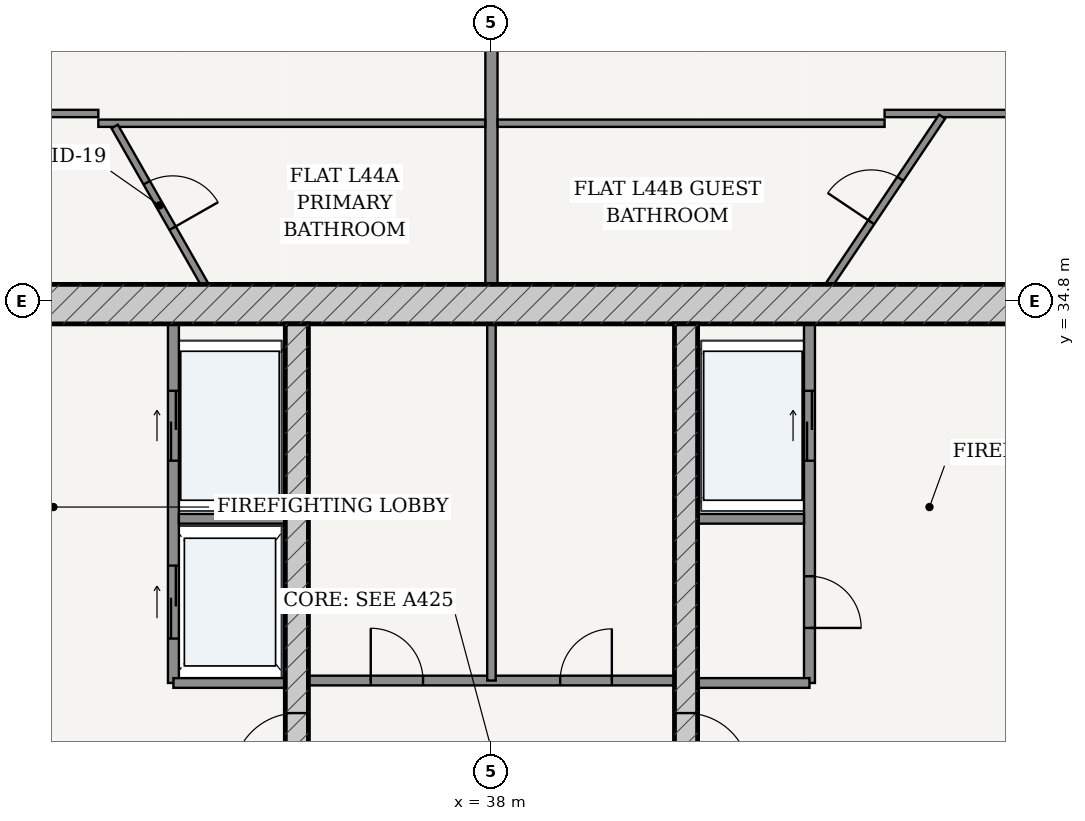
"""IFC4 building model, lengths in metres.
Left out: names, types, materials, properties, quantities, classifications, styles, units other than length and angle.
Written with IfcOpenShell. Run it as: python <this file> out.ifc"""

import sys

from ifc_helpers import new_model, si_unit, direction, frame, frame_2d, origin, place, context, subcontext, project, spatial, rectangle, extrude, source, transform, mapped, element, fill, save


model = new_model("IFC4")
c1 = context("Model", 3, precision=1e-05, world=origin(), true_north=direction((-0.2419218956, 0.970295726276)))
c2 = subcontext(c1, "Body", "Model", "MODEL_VIEW")
j1 = project(units=[si_unit("LENGTHUNIT", "METRE"), si_unit("PLANEANGLEUNIT", "RADIAN")], contexts=[c1])
p1 = place(None, origin())
s1 = spatial("IfcSite", under=j1, at=p1, CompositionType="ELEMENT")
p2 = place(p1, origin())
s2 = spatial("IfcBuilding", under=s1, at=p2, CompositionType="ELEMENT")
p3 = place(p2, frame((0.0, 0.0, 167.8)))
s3 = spatial("IfcBuildingStorey", under=s2, at=p3, CompositionType="ELEMENT", Elevation=167.8)
p4 = place(p3, frame((28.725, 34.75, 0.0), z_axis=(0.0, 0.0, 1.0), x_axis=(1.0, 0.0, 0.0)))
e1 = element("IfcWall", 1, at=p4, inside=s3, PredefinedType="SHEAR", context=c2, shape_type="SweptSolid", body=[
    extrude(rectangle(XDim=18.55, YDim=0.65, at=frame_2d((9.275, 0.0))), origin(), (0.0, 0.0, 1.0), 3.33),
])
p5 = place(p3, frame((34.8, 19.175, 0.0), z_axis=(0.0, 0.0, 1.0), x_axis=(0.0, 1.0, 0.0)))
e2 = element("IfcWall", 2, at=p5, inside=s3, PredefinedType="SHEAR", context=c2, shape_type="SweptSolid", body=[
    extrude(rectangle(XDim=15.25, YDim=0.38, at=frame_2d((7.625, 0.0))), origin(), (0.0, 0.0, 1.0), 3.33),
])
p6 = place(p5, frame((7.8, 0.0, 0.0)))
e3 = element("IfcOpeningElement", 3, at=p6, cuts=e2, PredefinedType="OPENING", context=c2, shape_type="SweptSolid", body=[
    extrude(rectangle(XDim=1.05, YDim=2.15, at=frame_2d((0.525, 1.075))), frame((0.0, 0.2, 0.0), z_axis=(0.0, -1.0, 0.0), x_axis=(1.0, 0.0, 0.0)), (0.0, 0.0, 1.0), 0.4),
])
p7 = place(p3, frame((41.2, 19.175, 0.0), z_axis=(0.0, 0.0, 1.0), x_axis=(0.0, 1.0, 0.0)))
e4 = element("IfcWall", 4, at=p7, inside=s3, PredefinedType="SHEAR", context=c2, shape_type="SweptSolid", body=[
    extrude(rectangle(XDim=15.25, YDim=0.38, at=frame_2d((7.625, 0.0))), origin(), (0.0, 0.0, 1.0), 3.33),
])
p8 = place(p7, frame((7.8, 0.0, 0.0)))
e5 = element("IfcOpeningElement", 5, at=p8, cuts=e4, PredefinedType="OPENING", context=c2, shape_type="SweptSolid", body=[
    extrude(rectangle(XDim=1.05, YDim=2.15, at=frame_2d((0.525, 1.075))), frame((0.0, 0.2, 0.0), z_axis=(0.0, -1.0, 0.0), x_axis=(1.0, 0.0, 0.0)), (0.0, 0.0, 1.0), 0.4),
])
p9 = place(p3, frame((32.77, 28.52, 0.0), z_axis=(0.0, 0.0, 1.0), x_axis=(0.0, 1.0, 0.0)))
e6 = element("IfcWall", 6, at=p9, inside=s3, PredefinedType="PARTITIONING", context=c2, shape_type="SweptSolid", body=[
    extrude(rectangle(XDim=5.905, YDim=0.18, at=frame_2d((2.953, 0.0))), origin(), (0.0, 0.0, 1.0), 3.33),
])
p10 = place(p9, frame((3.655, 0.0, 0.0)))
e7 = element("IfcOpeningElement", 7, at=p10, cuts=e6, PredefinedType="OPENING", context=c2, shape_type="SweptSolid", body=[
    extrude(rectangle(XDim=1.15, YDim=2.2, at=frame_2d((0.575, 1.1))), frame((0.0, 0.1, 0.0), z_axis=(0.0, -1.0, 0.0), x_axis=(1.0, 0.0, 0.0)), (0.0, 0.0, 1.0), 0.2),
])
p11 = place(p9, frame((0.73, 0.0, 0.0)))
e8 = element("IfcOpeningElement", 8, at=p11, cuts=e6, PredefinedType="OPENING", context=c2, shape_type="SweptSolid", body=[
    extrude(rectangle(XDim=1.2, YDim=2.25, at=frame_2d((0.6, 1.125))), frame((0.0, 0.1, 0.0), z_axis=(0.0, -1.0, 0.0), x_axis=(1.0, 0.0, 0.0)), (0.0, 0.0, 1.0), 0.2),
])
p12 = place(p3, frame((32.86, 31.22, 0.0), z_axis=(0.0, 0.0, 1.0), x_axis=(1.0, 0.0, 0.0)))
e9 = element("IfcWall", 9, at=p12, inside=s3, PredefinedType="PARTITIONING", context=c2, shape_type="SweptSolid", body=[
    extrude(rectangle(XDim=1.75, YDim=0.16, at=frame_2d((0.875, 0.0))), origin(), (0.0, 0.0, 1.0), 3.33),
])
p13 = place(p3, frame((32.77, 28.52, 0.0), z_axis=(0.0, 0.0, 1.0), x_axis=(1.0, 0.0, 0.0)))
e10 = element("IfcWall", 10, at=p13, inside=s3, PredefinedType="PARTITIONING", context=c2, shape_type="SweptSolid", body=[
    extrude(rectangle(XDim=1.84, YDim=0.16, at=frame_2d((0.92, 0.0))), origin(), (0.0, 0.0, 1.0), 3.33),
])
p14 = place(p3, frame((43.23, 28.52, 0.0), z_axis=(0.0, 0.0, 1.0), x_axis=(0.0, 1.0, 0.0)))
e11 = element("IfcWall", 11, at=p14, inside=s3, PredefinedType="PARTITIONING", context=c2, shape_type="SweptSolid", body=[
    extrude(rectangle(XDim=5.905, YDim=0.18, at=frame_2d((2.953, 0.0))), origin(), (0.0, 0.0, 1.0), 3.33),
])
p15 = place(p14, frame((0.905, 0.0, 0.0)))
e12 = element("IfcOpeningElement", 12, at=p15, cuts=e11, PredefinedType="OPENING", context=c2, shape_type="SweptSolid", body=[
    extrude(rectangle(XDim=0.85, YDim=2.1, at=frame_2d((0.425, 1.05))), frame((0.0, 0.1, 0.0), z_axis=(0.0, -1.0, 0.0), x_axis=(1.0, 0.0, 0.0)), (0.0, 0.0, 1.0), 0.2),
])
p16 = place(p14, frame((3.655, 0.0, 0.0)))
e13 = element("IfcOpeningElement", 13, at=p16, cuts=e11, PredefinedType="OPENING", context=c2, shape_type="SweptSolid", body=[
    extrude(rectangle(XDim=1.15, YDim=2.2, at=frame_2d((0.575, 1.1))), frame((0.0, 0.1, 0.0), z_axis=(0.0, -1.0, 0.0), x_axis=(1.0, 0.0, 0.0)), (0.0, 0.0, 1.0), 0.2),
])
p17 = place(p3, frame((41.39, 31.22, 0.0), z_axis=(0.0, 0.0, 1.0), x_axis=(1.0, 0.0, 0.0)))
e14 = element("IfcWall", 14, at=p17, inside=s3, PredefinedType="PARTITIONING", context=c2, shape_type="SweptSolid", body=[
    extrude(rectangle(XDim=1.75, YDim=0.16, at=frame_2d((0.875, 0.0))), origin(), (0.0, 0.0, 1.0), 3.33),
])
p18 = place(p3, frame((41.39, 28.52, 0.0), z_axis=(0.0, 0.0, 1.0), x_axis=(1.0, 0.0, 0.0)))
e15 = element("IfcWall", 15, at=p18, inside=s3, PredefinedType="PARTITIONING", context=c2, shape_type="SweptSolid", body=[
    extrude(rectangle(XDim=1.84, YDim=0.16, at=frame_2d((0.92, 0.0))), origin(), (0.0, 0.0, 1.0), 3.33),
])
p19 = place(p3, frame((34.99, 28.56, 0.0), z_axis=(0.0, 0.0, 1.0), x_axis=(1.0, 0.0, 0.0)))
e16 = element("IfcWall", 16, at=p19, inside=s3, PredefinedType="PARTITIONING", context=c2, shape_type="SweptSolid", body=[
    extrude(rectangle(XDim=6.02, YDim=0.16, at=frame_2d((3.01, 0.0))), origin(), (0.0, 0.0, 1.0), 3.33),
])
p20 = place(p19, frame((1.025, 0.0, 0.0)))
e17 = element("IfcOpeningElement", 17, at=p20, cuts=e16, PredefinedType="OPENING", context=c2, shape_type="SweptSolid", body=[
    extrude(rectangle(XDim=0.86, YDim=2.1, at=frame_2d((0.43, 1.05))), frame((0.0, 0.09, 0.0), z_axis=(0.0, -1.0, 0.0), x_axis=(1.0, 0.0, 0.0)), (0.0, 0.0, 1.0), 0.18),
])
p21 = place(p19, frame((4.14, 0.0, 0.0)))
e18 = element("IfcOpeningElement", 18, at=p21, cuts=e16, PredefinedType="OPENING", context=c2, shape_type="SweptSolid", body=[
    extrude(rectangle(XDim=0.85, YDim=2.1, at=frame_2d((0.425, 1.05))), frame((0.0, 0.09, 0.0), z_axis=(0.0, -1.0, 0.0), x_axis=(1.0, 0.0, 0.0)), (0.0, 0.0, 1.0), 0.18),
])
p22 = place(p3, frame((38.0, 28.56, 0.0), z_axis=(0.0, 0.0, 1.0), x_axis=(0.0, 1.0, 0.0)))
e19 = element("IfcWall", 19, at=p22, inside=s3, PredefinedType="PARTITIONING", context=c2, shape_type="SweptSolid", body=[
    extrude(rectangle(XDim=5.865, YDim=0.14, at=frame_2d((2.933, 0.0))), origin(), (0.0, 0.0, 1.0), 3.33),
])
p23 = place(p3, frame((38.0, 35.075, 0.0), z_axis=(0.0, 0.0, 1.0), x_axis=(0.0, 1.0, 0.0)))
e20 = element("IfcWall", 20, at=p23, inside=s3, PredefinedType="PARTITIONING", context=c2, shape_type="SweptSolid", body=[
    extrude(rectangle(XDim=12.465, YDim=0.2, at=frame_2d((6.232, 0.0))), origin(), (0.0, 0.0, 1.0), 2.415),
])
p24 = place(p3, frame((24.065, 37.885, 0.0), z_axis=(0.0, 0.0, 1.0), x_axis=(1.0, 0.0, 0.0)))
e21 = element("IfcWall", 21, at=p24, inside=s3, PredefinedType="PARTITIONING", context=c2, shape_type="SweptSolid", body=[
    extrude(rectangle(XDim=7.47, YDim=0.12, at=frame_2d((3.735, 0.0))), origin(), (0.0, 0.0, 1.0), 2.776),
])
p25 = place(p24, frame((3.62, 0.0, 0.0)))
e22 = element("IfcOpeningElement", 22, at=p25, cuts=e21, PredefinedType="OPENING", context=c2, shape_type="SweptSolid", body=[
    extrude(rectangle(XDim=0.9, YDim=2.15, at=frame_2d((0.45, 1.075))), frame((0.0, 0.07, 0.0), z_axis=(0.0, -1.0, 0.0), x_axis=(1.0, 0.0, 0.0)), (0.0, 0.0, 1.0), 0.14),
])
p26 = place(p3, frame((31.535, 37.725, 0.0), z_axis=(0.0, 0.0, 1.0), x_axis=(1.0, 0.0, 0.0)))
e23 = element("IfcWall", 23, at=p26, inside=s3, PredefinedType="PARTITIONING", context=c2, shape_type="SweptSolid", body=[
    extrude(rectangle(XDim=6.363, YDim=0.12, at=frame_2d((3.182, 0.0))), origin(), (0.0, 0.0, 1.0), 2.776),
])
p27 = place(p3, frame((33.283, 35.075, 0.0), z_axis=(0.0, 0.0, 1.0), x_axis=(-0.495179611311, 0.868790626412, 0.0)))
e24 = element("IfcWall", 24, at=p27, inside=s3, PredefinedType="PARTITIONING", context=c2, shape_type="SweptSolid", body=[
    extrude(rectangle(XDim=2.988, YDim=0.12, at=frame_2d((1.494, 0.0))), origin(), (0.0, 0.0, 1.0), 3.33),
])
p28 = place(p27, frame((1.064, 0.0, 0.0)))
e25 = element("IfcOpeningElement", 25, at=p28, cuts=e24, PredefinedType="OPENING", context=c2, shape_type="SweptSolid", body=[
    extrude(rectangle(XDim=0.86, YDim=2.15, at=frame_2d((0.43, 1.075))), frame((0.0, 0.07, 0.0), z_axis=(0.0, -1.0, 0.0), x_axis=(1.0, 0.0, 0.0)), (0.0, 0.0, 1.0), 0.14),
])
p29 = place(p3, frame((38.102, 37.725, 0.0), z_axis=(0.0, 0.0, 1.0), x_axis=(1.0, 0.0, 0.0)))
e26 = element("IfcWall", 26, at=p29, inside=s3, PredefinedType="PARTITIONING", context=c2, shape_type="SweptSolid", body=[
    extrude(rectangle(XDim=6.363, YDim=0.12, at=frame_2d((3.182, 0.0))), origin(), (0.0, 0.0, 1.0), 2.776),
])
p30 = place(p3, frame((44.465, 37.885, 0.0), z_axis=(0.0, 0.0, 1.0), x_axis=(1.0, 0.0, 0.0)))
e27 = element("IfcWall", 27, at=p30, inside=s3, PredefinedType="PARTITIONING", context=c2, shape_type="SweptSolid", body=[
    extrude(rectangle(XDim=7.47, YDim=0.12, at=frame_2d((3.735, 0.0))), origin(), (0.0, 0.0, 1.0), 2.776),
])
p31 = place(p30, frame((4.241, 0.0, 0.0)))
e28 = element("IfcOpeningElement", 28, at=p31, cuts=e27, PredefinedType="OPENING", context=c2, shape_type="SweptSolid", body=[
    extrude(rectangle(XDim=0.9, YDim=2.15, at=frame_2d((0.45, 1.075))), frame((0.0, 0.07, 0.0), z_axis=(0.0, -1.0, 0.0), x_axis=(1.0, 0.0, 0.0)), (0.0, 0.0, 1.0), 0.14),
])
p32 = place(p3, frame((43.559, 35.075, 0.0), z_axis=(0.0, 0.0, 1.0), x_axis=(0.557612855606, 0.830101140381, 0.0)))
e29 = element("IfcWall", 29, at=p32, inside=s3, PredefinedType="PARTITIONING", context=c2, shape_type="SweptSolid", body=[
    extrude(rectangle(XDim=3.323, YDim=0.12, at=frame_2d((1.662, 0.0))), origin(), (0.0, 0.0, 1.0), 3.33),
])
p33 = place(p32, frame((1.232, 0.0, 0.0)))
e30 = element("IfcOpeningElement", 30, at=p33, cuts=e29, PredefinedType="OPENING", context=c2, shape_type="SweptSolid", body=[
    extrude(rectangle(XDim=0.86, YDim=2.15, at=frame_2d((0.43, 1.075))), frame((0.0, 0.07, 0.0), z_axis=(0.0, -1.0, 0.0), x_axis=(1.0, 0.0, 0.0)), (0.0, 0.0, 1.0), 0.14),
])
m1 = source(origin(), c2, "Body", "SweptSolid", [
    extrude(rectangle(XDim=1.05, YDim=2.15, at=frame_2d((0.525, 1.075))), frame((0.0, 0.025, 0.0), z_axis=(0.0, -1.0, 0.0), x_axis=(1.0, 0.0, 0.0)), (0.0, 0.0, 1.0), 0.05),
])
p34 = place(p6, origin())
e31 = element("IfcDoor", 31, at=p34, inside=s3, OperationType="SINGLE_SWING_LEFT", PredefinedType="DOOR", context=c2, shape_type="MappedRepresentation", body=[
    mapped(m1, transform((0.0, 0.0, 0.0), scale=1.0)),
])
fill(e3, e31)
p35 = place(p8, frame((1.05, 0.0, 0.0), z_axis=(0.0, 0.0, 1.0), x_axis=(-1.0, 0.0, 0.0)))
e32 = element("IfcDoor", 32, at=p35, inside=s3, OperationType="SINGLE_SWING_RIGHT", PredefinedType="DOOR", context=c2, shape_type="MappedRepresentation", body=[
    mapped(m1, transform((0.0, 0.0, 0.0), scale=1.0)),
])
fill(e5, e32)
m2 = source(origin(), c2, "Body", "SweptSolid", [
    extrude(rectangle(XDim=0.85, YDim=2.1, at=frame_2d((0.425, 1.05))), frame((0.0, 0.025, 0.0), z_axis=(0.0, -1.0, 0.0), x_axis=(1.0, 0.0, 0.0)), (0.0, 0.0, 1.0), 0.05),
])
p36 = place(p15, frame((0.85, 0.0, 0.0), z_axis=(0.0, 0.0, 1.0), x_axis=(-1.0, 0.0, 0.0)))
e33 = element("IfcDoor", 33, at=p36, inside=s3, OperationType="SINGLE_SWING_RIGHT", PredefinedType="DOOR", context=c2, shape_type="MappedRepresentation", body=[
    mapped(m2, transform((0.0, 0.0, 0.0), scale=1.0)),
])
fill(e12, e33)
m3 = source(origin(), c2, "Body", "SweptSolid", [
    extrude(rectangle(XDim=0.86, YDim=2.1, at=frame_2d((0.43, 1.05))), frame((0.0, 0.025, 0.0), z_axis=(0.0, -1.0, 0.0), x_axis=(1.0, 0.0, 0.0)), (0.0, 0.0, 1.0), 0.05),
])
p37 = place(p20, origin())
e34 = element("IfcDoor", 34, at=p37, inside=s3, OperationType="SINGLE_SWING_LEFT", PredefinedType="DOOR", context=c2, shape_type="MappedRepresentation", body=[
    mapped(m3, transform((0.0, 0.0, 0.0), scale=1.0)),
])
fill(e17, e34)
p38 = place(p21, origin())
e35 = element("IfcDoor", 35, at=p38, inside=s3, OperationType="SINGLE_SWING_RIGHT", PredefinedType="DOOR", context=c2, shape_type="MappedRepresentation", body=[
    mapped(m2, transform((0.0, 0.0, 0.0), scale=1.0)),
])
fill(e18, e35)
m4 = source(origin(), c2, "Body", "SweptSolid", [
    extrude(rectangle(XDim=1.15, YDim=2.2, at=frame_2d((0.575, 1.1))), frame((0.0, 0.025, 0.0), z_axis=(0.0, -1.0, 0.0), x_axis=(1.0, 0.0, 0.0)), (0.0, 0.0, 1.0), 0.05),
])
p39 = place(p10, origin())
e36 = element("IfcDoor", 36, at=p39, inside=s3, OperationType="DOUBLE_DOOR_SLIDING", PredefinedType="DOOR", context=c2, shape_type="MappedRepresentation", body=[
    mapped(m4, transform((0.0, 0.0, 0.0), scale=1.0)),
])
fill(e7, e36)
p40 = place(p16, origin())
e37 = element("IfcDoor", 37, at=p40, inside=s3, OperationType="DOUBLE_DOOR_SLIDING", PredefinedType="DOOR", context=c2, shape_type="MappedRepresentation", body=[
    mapped(m4, transform((0.0, 0.0, 0.0), scale=1.0)),
])
fill(e13, e37)
m5 = source(origin(), c2, "Body", "SweptSolid", [
    extrude(rectangle(XDim=1.2, YDim=2.25, at=frame_2d((0.6, 1.125))), frame((0.0, 0.025, 0.0), z_axis=(0.0, -1.0, 0.0), x_axis=(1.0, 0.0, 0.0)), (0.0, 0.0, 1.0), 0.05),
])
p41 = place(p11, origin())
e38 = element("IfcDoor", 38, at=p41, inside=s3, OperationType="DOUBLE_DOOR_SLIDING", PredefinedType="DOOR", context=c2, shape_type="MappedRepresentation", body=[
    mapped(m5, transform((0.0, 0.0, 0.0), scale=1.0)),
])
fill(e8, e38)
m6 = source(origin(), c2, "Body", "SweptSolid", [
    extrude(rectangle(XDim=0.86, YDim=2.15, at=frame_2d((0.43, 1.075))), frame((0.0, 0.025, 0.0), z_axis=(0.0, -1.0, 0.0), x_axis=(1.0, 0.0, 0.0)), (0.0, 0.0, 1.0), 0.05),
])
p42 = place(p28, frame((0.86, 0.0, 0.0), z_axis=(0.0, 0.0, 1.0), x_axis=(-1.0, 0.0, 0.0)))
e39 = element("IfcDoor", 39, at=p42, inside=s3, OperationType="SINGLE_SWING_RIGHT", PredefinedType="DOOR", context=c2, shape_type="MappedRepresentation", body=[
    mapped(m6, transform((0.0, 0.0, 0.0), scale=1.0)),
])
fill(e25, e39)
p43 = place(p33, origin())
e40 = element("IfcDoor", 40, at=p43, inside=s3, OperationType="SINGLE_SWING_LEFT", PredefinedType="DOOR", context=c2, shape_type="MappedRepresentation", body=[
    mapped(m6, transform((0.0, 0.0, 0.0), scale=1.0)),
])
fill(e30, e40)
save(model, sys.argv[1])
